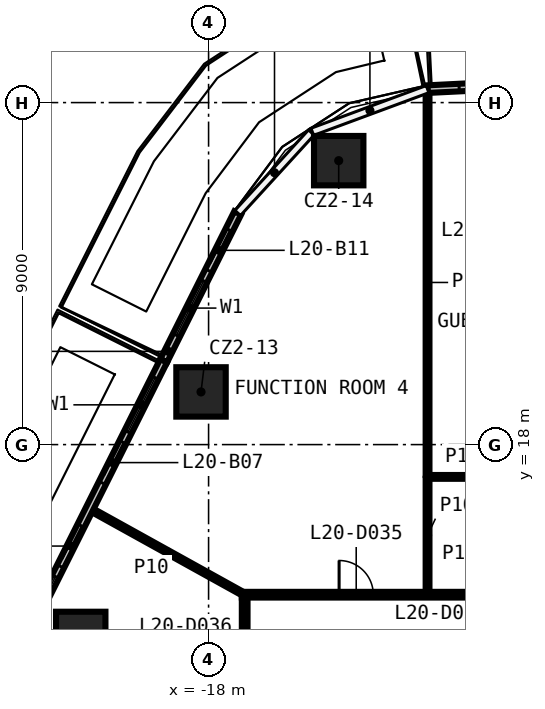
"""IFC4 building model, lengths in metres.
Left out: names, types, materials, properties, quantities, classifications, styles, units other than length and angle.
Written with IfcOpenShell. Run it as: python <this file> out.ifc"""

import sys

from ifc_helpers import new_model, si_unit, direction, frame, frame_2d, origin, origin_2d, place, context, subcontext, project, spatial, rectangle, extrude, element, fill, save


model = new_model("IFC4")
c1 = context("Model", 3, precision=1e-05, world=origin(), true_north=direction((0.0, 1.0)))
c2 = subcontext(c1, "Body", "Model", "MODEL_VIEW")
j1 = project(units=[si_unit("LENGTHUNIT", "METRE"), si_unit("PLANEANGLEUNIT", "RADIAN")], contexts=[c1])
p1 = place(None, origin())
s1 = spatial("IfcSite", under=j1, at=p1, CompositionType="ELEMENT")
p2 = place(p1, origin())
s2 = spatial("IfcBuilding", under=s1, at=p2, CompositionType="ELEMENT")
p3 = place(p2, frame((0.0, 0.0, 98.9)))
s3 = spatial("IfcBuildingStorey", under=s2, at=p3, CompositionType="ELEMENT", Elevation=98.9)
for number, where, z_axis, x_axis in (
    (1, (-21.364, 12.952, 0.0), (0.0, 0.0, 1.0), (1.0, 0.0, 0.0)),
    (2, (-18.199, 19.386, 0.0), (0.0, 0.0, 1.0), (1.0, 0.0, 0.0)),
    (3, (-14.576, 25.472, 0.0), (0.0, 0.0, 1.0), (1.0, 0.0, 0.0)),
):
    element("IfcColumn", number, at=place(p3, frame(where, z_axis=z_axis, x_axis=x_axis)), inside=s3, PredefinedType="COLUMN", context=c2, shape_type="SweptSolid", body=[
        extrude(rectangle(XDim=1.3, YDim=1.3, at=origin_2d()), origin(), (0.0, 0.0, 1.0), 3.25),
    ])
p4 = place(p3, frame((-17.125, 14.05, 0.0), z_axis=(0.0, 0.0, 1.0), x_axis=(1.0, 0.0, 0.0)))
e4 = element("IfcWall", 4, at=p4, inside=s3, PredefinedType="PARTITIONING", context=c2, shape_type="SweptSolid", body=[
    extrude(rectangle(XDim=34.25, YDim=0.15, at=frame_2d((17.125, 0.0))), origin(), (0.0, 0.0, 1.0), 3.25),
])
p5 = place(p4, frame((29.757, 0.0, 0.0)))
e5 = element("IfcOpeningElement", 5, at=p5, cuts=e4, PredefinedType="OPENING", context=c2, shape_type="SweptSolid", body=[
    extrude(rectangle(XDim=1.0, YDim=2.1, at=frame_2d((0.5, 1.05))), frame((0.0, 0.085, 0.0), z_axis=(0.0, -1.0, 0.0), x_axis=(1.0, 0.0, 0.0)), (0.0, 0.0, 1.0), 0.17),
])
p6 = place(p4, frame((18.682, 0.0, 0.0)))
e6 = element("IfcOpeningElement", 6, at=p6, cuts=e4, PredefinedType="OPENING", context=c2, shape_type="SweptSolid", body=[
    extrude(rectangle(XDim=1.0, YDim=2.1, at=frame_2d((0.5, 1.05))), frame((0.0, 0.085, 0.0), z_axis=(0.0, -1.0, 0.0), x_axis=(1.0, 0.0, 0.0)), (0.0, 0.0, 1.0), 0.17),
])
p7 = place(p4, frame((16.654, 0.0, 0.0)))
e7 = element("IfcOpeningElement", 7, at=p7, cuts=e4, PredefinedType="OPENING", context=c2, shape_type="SweptSolid", body=[
    extrude(rectangle(XDim=1.0, YDim=2.1, at=frame_2d((0.5, 1.05))), frame((0.0, 0.085, 0.0), z_axis=(0.0, -1.0, 0.0), x_axis=(1.0, 0.0, 0.0)), (0.0, 0.0, 1.0), 0.17),
])
p8 = place(p4, frame((9.827, 0.0, 0.0)))
e8 = element("IfcOpeningElement", 8, at=p8, cuts=e4, PredefinedType="OPENING", context=c2, shape_type="SweptSolid", body=[
    extrude(rectangle(XDim=1.0, YDim=2.1, at=frame_2d((0.5, 1.05))), frame((0.0, 0.085, 0.0), z_axis=(0.0, -1.0, 0.0), x_axis=(1.0, 0.0, 0.0)), (0.0, 0.0, 1.0), 0.17),
])
p9 = place(p4, frame((7.8, 0.0, 0.0)))
e9 = element("IfcOpeningElement", 9, at=p9, cuts=e4, PredefinedType="OPENING", context=c2, shape_type="SweptSolid", body=[
    extrude(rectangle(XDim=1.0, YDim=2.1, at=frame_2d((0.5, 1.05))), frame((0.0, 0.085, 0.0), z_axis=(0.0, -1.0, 0.0), x_axis=(1.0, 0.0, 0.0)), (0.0, 0.0, 1.0), 0.17),
])
p10 = place(p4, frame((2.56, 0.0, 0.0)))
e10 = element("IfcOpeningElement", 10, at=p10, cuts=e4, PredefinedType="OPENING", context=c2, shape_type="SweptSolid", body=[
    extrude(rectangle(XDim=0.9, YDim=2.1, at=frame_2d((0.45, 1.05))), frame((0.0, 0.085, 0.0), z_axis=(0.0, -1.0, 0.0), x_axis=(1.0, 0.0, 0.0)), (0.0, 0.0, 1.0), 0.17),
])
p11 = place(p3, frame((-12.238, 17.15, 0.0), z_axis=(0.0, 0.0, 1.0), x_axis=(1.0, 0.0, 0.0)))
e11 = element("IfcWall", 11, at=p11, inside=s3, PredefinedType="PARTITIONING", context=c2, shape_type="SweptSolid", body=[
    extrude(rectangle(XDim=2.45, YDim=0.1, at=frame_2d((1.225, 0.0))), origin(), (0.0, 0.0, 1.0), 3.25),
])
p12 = place(p3, frame((-12.238, 14.125, 0.0), z_axis=(0.0, 0.0, 1.0), x_axis=(0.0, 1.0, 0.0)))
e12 = element("IfcWall", 12, at=p12, inside=s3, PredefinedType="PARTITIONING", context=c2, shape_type="SweptSolid", body=[
    extrude(rectangle(XDim=2.975, YDim=0.1, at=frame_2d((1.488, 0.0))), origin(), (0.0, 0.0, 1.0), 3.25),
])
p13 = place(p3, frame((-12.238, 17.2, 0.0), z_axis=(0.0, 0.0, 1.0), x_axis=(0.0, 1.0, 0.0)))
e13 = element("IfcWall", 13, at=p13, inside=s3, PredefinedType="PARTITIONING", context=c2, shape_type="SweptSolid", body=[
    extrude(rectangle(XDim=10.133, YDim=0.1, at=frame_2d((5.067, 0.0))), origin(), (0.0, 0.0, 1.0), 3.25),
])
p14 = place(p3, frame((-17.05, -13.975, 0.0), z_axis=(0.0, 0.0, 1.0), x_axis=(0.0, 1.0, 0.0)))
e14 = element("IfcWall", 14, at=p14, inside=s3, PredefinedType="PARTITIONING", context=c2, shape_type="SweptSolid", body=[
    extrude(rectangle(XDim=27.95, YDim=0.15, at=frame_2d((13.975, 0.0))), origin(), (0.0, 0.0, 1.0), 3.25),
])
p15 = place(p14, frame((11.195, 0.0, 0.0)))
e15 = element("IfcOpeningElement", 15, at=p15, cuts=e14, PredefinedType="OPENING", context=c2, shape_type="SweptSolid", body=[
    extrude(rectangle(XDim=0.9, YDim=2.1, at=frame_2d((0.45, 1.05))), frame((0.0, 0.085, 0.0), z_axis=(0.0, -1.0, 0.0), x_axis=(1.0, 0.0, 0.0)), (0.0, 0.0, 1.0), 0.17),
])
p16 = place(p14, frame((8.57, 0.0, 0.0)))
e16 = element("IfcOpeningElement", 16, at=p16, cuts=e14, PredefinedType="OPENING", context=c2, shape_type="SweptSolid", body=[
    extrude(rectangle(XDim=0.9, YDim=2.1, at=frame_2d((0.45, 1.05))), frame((0.0, 0.085, 0.0), z_axis=(0.0, -1.0, 0.0), x_axis=(1.0, 0.0, 0.0)), (0.0, 0.0, 1.0), 0.17),
])
p17 = place(p14, frame((1.956, 0.0, 0.0)))
e17 = element("IfcOpeningElement", 17, at=p17, cuts=e14, PredefinedType="OPENING", context=c2, shape_type="SweptSolid", body=[
    extrude(rectangle(XDim=0.9, YDim=2.1, at=frame_2d((0.45, 1.05))), frame((0.0, 0.085, 0.0), z_axis=(0.0, -1.0, 0.0), x_axis=(1.0, 0.0, 0.0)), (0.0, 0.0, 1.0), 0.17),
])
p18 = place(p14, frame((25.181, 0.0, 0.0)))
e18 = element("IfcOpeningElement", 18, at=p18, cuts=e14, PredefinedType="OPENING", context=c2, shape_type="SweptSolid", body=[
    extrude(rectangle(XDim=0.9, YDim=2.1, at=frame_2d((0.45, 1.05))), frame((0.0, 0.085, 0.0), z_axis=(0.0, -1.0, 0.0), x_axis=(1.0, 0.0, 0.0)), (0.0, 0.0, 1.0), 0.17),
])
p19 = place(p14, frame((20.101, 0.0, 0.0)))
e19 = element("IfcOpeningElement", 19, at=p19, cuts=e14, PredefinedType="OPENING", context=c2, shape_type="SweptSolid", body=[
    extrude(rectangle(XDim=0.9, YDim=2.1, at=frame_2d((0.45, 1.05))), frame((0.0, 0.085, 0.0), z_axis=(0.0, -1.0, 0.0), x_axis=(1.0, 0.0, 0.0)), (0.0, 0.0, 1.0), 0.17),
])
p20 = place(p14, frame((16.206, 0.0, 0.0)))
e20 = element("IfcOpeningElement", 20, at=p20, cuts=e14, PredefinedType="OPENING", context=c2, shape_type="SweptSolid", body=[
    extrude(rectangle(XDim=0.9, YDim=2.1, at=frame_2d((0.45, 1.05))), frame((0.0, 0.085, 0.0), z_axis=(0.0, -1.0, 0.0), x_axis=(1.0, 0.0, 0.0)), (0.0, 0.0, 1.0), 0.17),
])
p21 = place(p3, frame((-21.115, 16.303, 0.0), z_axis=(0.0, 0.0, 1.0), x_axis=(0.874615252971, -0.484817655692, 0.0)))
e21 = element("IfcWall", 21, at=p21, inside=s3, PredefinedType="PARTITIONING", context=c2, shape_type="SweptSolid", body=[
    extrude(rectangle(XDim=4.648, YDim=0.1, at=frame_2d((2.324, 0.0))), origin(), (0.0, 0.0, 1.0), 3.25),
])
p22 = place(p3, frame((1.042, 28.012, 0.0), z_axis=(0.0, 0.0, 1.0), x_axis=(-0.998772222794, -0.049538338427, 0.0)))
e22 = element("IfcWall", 22, at=p22, inside=s3, PredefinedType="SOLIDWALL", context=c2, shape_type="SweptSolid", body=[
    extrude(rectangle(XDim=13.297, YDim=0.2, at=frame_2d((6.648, 0.0))), origin(), (0.0, 0.0, 1.0), 3.25),
])
p23 = place(p22, frame((2.0, 0.0, 0.6)))
e23 = element("IfcOpeningElement", 23, at=p23, cuts=e22, PredefinedType="OPENING", context=c2, shape_type="SweptSolid", body=[
    extrude(rectangle(XDim=1.6, YDim=2.4, at=frame_2d((0.8, 1.2))), frame((0.0, 0.11, 0.0), z_axis=(0.0, -1.0, 0.0), x_axis=(1.0, 0.0, 0.0)), (0.0, 0.0, 1.0), 0.22),
])
p24 = place(p22, frame((0.5, 0.0, 0.0)))
e24 = element("IfcOpeningElement", 24, at=p24, cuts=e22, PredefinedType="OPENING", context=c2, shape_type="SweptSolid", body=[
    extrude(rectangle(XDim=1.2, YDim=2.4, at=frame_2d((0.6, 1.2))), frame((0.0, 0.11, 0.0), z_axis=(0.0, -1.0, 0.0), x_axis=(1.0, 0.0, 0.0)), (0.0, 0.0, 1.0), 0.22),
])
p25 = place(p22, frame((6.432, 0.0, 0.6)))
e25 = element("IfcOpeningElement", 25, at=p25, cuts=e22, PredefinedType="OPENING", context=c2, shape_type="SweptSolid", body=[
    extrude(rectangle(XDim=1.6, YDim=2.4, at=frame_2d((0.8, 1.2))), frame((0.0, 0.11, 0.0), z_axis=(0.0, -1.0, 0.0), x_axis=(1.0, 0.0, 0.0)), (0.0, 0.0, 1.0), 0.22),
])
p26 = place(p22, frame((4.932, 0.0, 0.0)))
e26 = element("IfcOpeningElement", 26, at=p26, cuts=e22, PredefinedType="OPENING", context=c2, shape_type="SweptSolid", body=[
    extrude(rectangle(XDim=1.2, YDim=2.4, at=frame_2d((0.6, 1.2))), frame((0.0, 0.11, 0.0), z_axis=(0.0, -1.0, 0.0), x_axis=(1.0, 0.0, 0.0)), (0.0, 0.0, 1.0), 0.22),
])
p27 = place(p22, frame((9.365, 0.0, 0.6)))
e27 = element("IfcOpeningElement", 27, at=p27, cuts=e22, PredefinedType="OPENING", context=c2, shape_type="SweptSolid", body=[
    extrude(rectangle(XDim=1.6, YDim=2.4, at=frame_2d((0.8, 1.2))), frame((0.0, 0.11, 0.0), z_axis=(0.0, -1.0, 0.0), x_axis=(1.0, 0.0, 0.0)), (0.0, 0.0, 1.0), 0.22),
])
p28 = place(p22, frame((11.264, 0.0, 0.0)))
e28 = element("IfcOpeningElement", 28, at=p28, cuts=e22, PredefinedType="OPENING", context=c2, shape_type="SweptSolid", body=[
    extrude(rectangle(XDim=1.2, YDim=2.4, at=frame_2d((0.6, 1.2))), frame((0.0, 0.11, 0.0), z_axis=(0.0, -1.0, 0.0), x_axis=(1.0, 0.0, 0.0)), (0.0, 0.0, 1.0), 0.22),
])
p29 = place(p3, frame((-19.181, 20.208, 0.0), z_axis=(0.0, 0.0, 1.0), x_axis=(-0.447953166305, -0.894057023236, 0.0)))
e29 = element("IfcWall", 29, at=p29, inside=s3, PredefinedType="SOLIDWALL", context=c2, shape_type="SweptSolid", body=[
    extrude(rectangle(XDim=17.426, YDim=0.2, at=frame_2d((8.713, 0.0))), origin(), (0.0, 0.0, 1.0), 3.25),
])
p30 = place(p29, frame((0.5, 0.0, 0.6)))
e30 = element("IfcOpeningElement", 30, at=p30, cuts=e29, PredefinedType="OPENING", context=c2, shape_type="SweptSolid", body=[
    extrude(rectangle(XDim=1.6, YDim=2.4, at=frame_2d((0.8, 1.2))), frame((0.0, 0.11, 0.0), z_axis=(0.0, -1.0, 0.0), x_axis=(1.0, 0.0, 0.0)), (0.0, 0.0, 1.0), 0.22),
])
p31 = place(p29, frame((2.4, 0.0, 0.0)))
e31 = element("IfcOpeningElement", 31, at=p31, cuts=e29, PredefinedType="OPENING", context=c2, shape_type="SweptSolid", body=[
    extrude(rectangle(XDim=1.2, YDim=2.4, at=frame_2d((0.6, 1.2))), frame((0.0, 0.11, 0.0), z_axis=(0.0, -1.0, 0.0), x_axis=(1.0, 0.0, 0.0)), (0.0, 0.0, 1.0), 0.22),
])
p32 = place(p29, frame((6.357, 0.0, 0.6)))
e32 = element("IfcOpeningElement", 32, at=p32, cuts=e29, PredefinedType="OPENING", context=c2, shape_type="SweptSolid", body=[
    extrude(rectangle(XDim=1.6, YDim=2.4, at=frame_2d((0.8, 1.2))), frame((0.0, 0.11, 0.0), z_axis=(0.0, -1.0, 0.0), x_axis=(1.0, 0.0, 0.0)), (0.0, 0.0, 1.0), 0.22),
])
p33 = place(p29, frame((4.857, 0.0, 0.0)))
e33 = element("IfcOpeningElement", 33, at=p33, cuts=e29, PredefinedType="OPENING", context=c2, shape_type="SweptSolid", body=[
    extrude(rectangle(XDim=1.2, YDim=2.4, at=frame_2d((0.6, 1.2))), frame((0.0, 0.11, 0.0), z_axis=(0.0, -1.0, 0.0), x_axis=(1.0, 0.0, 0.0)), (0.0, 0.0, 1.0), 0.22),
])
p34 = place(p29, frame((10.713, 0.0, 0.6)))
e34 = element("IfcOpeningElement", 34, at=p34, cuts=e29, PredefinedType="OPENING", context=c2, shape_type="SweptSolid", body=[
    extrude(rectangle(XDim=1.6, YDim=2.4, at=frame_2d((0.8, 1.2))), frame((0.0, 0.11, 0.0), z_axis=(0.0, -1.0, 0.0), x_axis=(1.0, 0.0, 0.0)), (0.0, 0.0, 1.0), 0.22),
])
p35 = place(p29, frame((9.213, 0.0, 0.0)))
e35 = element("IfcOpeningElement", 35, at=p35, cuts=e29, PredefinedType="OPENING", context=c2, shape_type="SweptSolid", body=[
    extrude(rectangle(XDim=1.2, YDim=2.4, at=frame_2d((0.6, 1.2))), frame((0.0, 0.11, 0.0), z_axis=(0.0, -1.0, 0.0), x_axis=(1.0, 0.0, 0.0)), (0.0, 0.0, 1.0), 0.22),
])
p36 = place(p29, frame((13.57, 0.0, 0.6)))
e36 = element("IfcOpeningElement", 36, at=p36, cuts=e29, PredefinedType="OPENING", context=c2, shape_type="SweptSolid", body=[
    extrude(rectangle(XDim=1.6, YDim=2.4, at=frame_2d((0.8, 1.2))), frame((0.0, 0.11, 0.0), z_axis=(0.0, -1.0, 0.0), x_axis=(1.0, 0.0, 0.0)), (0.0, 0.0, 1.0), 0.22),
])
p37 = place(p29, frame((15.67, 0.0, 0.0)))
e37 = element("IfcOpeningElement", 37, at=p37, cuts=e29, PredefinedType="OPENING", context=c2, shape_type="SweptSolid", body=[
    extrude(rectangle(XDim=1.2, YDim=2.4, at=frame_2d((0.6, 1.2))), frame((0.0, 0.11, 0.0), z_axis=(0.0, -1.0, 0.0), x_axis=(1.0, 0.0, 0.0)), (0.0, 0.0, 1.0), 0.22),
])
p38 = place(p3, frame((-17.233, 24.096, 0.0), z_axis=(0.0, 0.0, 1.0), x_axis=(-0.447977093624, -0.89404503443, 0.0)))
e38 = element("IfcWall", 38, at=p38, inside=s3, PredefinedType="SOLIDWALL", context=c2, shape_type="SweptSolid", body=[
    extrude(rectangle(XDim=4.348, YDim=0.2, at=frame_2d((2.174, 0.0))), origin(), (0.0, 0.0, 1.0), 3.25),
])
p39 = place(p38, frame((2.0, 0.0, 0.6)))
e39 = element("IfcOpeningElement", 39, at=p39, cuts=e38, PredefinedType="OPENING", context=c2, shape_type="SweptSolid", body=[
    extrude(rectangle(XDim=1.6, YDim=2.4, at=frame_2d((0.8, 1.2))), frame((0.0, 0.11, 0.0), z_axis=(0.0, -1.0, 0.0), x_axis=(1.0, 0.0, 0.0)), (0.0, 0.0, 1.0), 0.22),
])
p40 = place(p38, frame((0.5, 0.0, 0.0)))
e40 = element("IfcOpeningElement", 40, at=p40, cuts=e38, PredefinedType="OPENING", context=c2, shape_type="SweptSolid", body=[
    extrude(rectangle(XDim=1.2, YDim=2.4, at=frame_2d((0.6, 1.2))), frame((0.0, 0.11, 0.0), z_axis=(0.0, -1.0, 0.0), x_axis=(1.0, 0.0, 0.0)), (0.0, 0.0, 1.0), 0.22),
])
p41 = place(p10, origin())
e41 = element("IfcDoor", 41, at=p41, inside=s3, OperationType="SINGLE_SWING_RIGHT", PredefinedType="DOOR", context=c2, shape_type="SweptSolid", body=[
    extrude(rectangle(XDim=0.9, YDim=2.1, at=frame_2d((0.45, 1.05))), frame((0.0, 0.025, 0.0), z_axis=(0.0, -1.0, 0.0), x_axis=(1.0, 0.0, 0.0)), (0.0, 0.0, 1.0), 0.05),
])
fill(e10, e41)
p42 = place(p28, origin())
e42 = element("IfcDoor", 42, at=p42, inside=s3, OperationType="SLIDING_TO_LEFT", PredefinedType="DOOR", context=c2, shape_type="SweptSolid", body=[
    extrude(rectangle(XDim=1.2, YDim=2.4, at=frame_2d((0.6, 1.2))), frame((0.0, 0.025, 0.0), z_axis=(0.0, -1.0, 0.0), x_axis=(1.0, 0.0, 0.0)), (0.0, 0.0, 1.0), 0.05),
])
fill(e28, e42)
p43 = place(p30, origin())
e43 = element("IfcWindow", 43, at=p43, inside=s3, PartitioningType="SINGLE_PANEL", PredefinedType="WINDOW", context=c2, shape_type="SweptSolid", body=[
    extrude(rectangle(XDim=1.6, YDim=2.4, at=frame_2d((0.8, 1.2))), frame((0.0, 0.03, 0.0), z_axis=(0.0, -1.0, 0.0), x_axis=(1.0, 0.0, 0.0)), (0.0, 0.0, 1.0), 0.06),
])
fill(e30, e43)
p44 = place(p31, origin())
e44 = element("IfcDoor", 44, at=p44, inside=s3, OperationType="SLIDING_TO_LEFT", PredefinedType="DOOR", context=c2, shape_type="SweptSolid", body=[
    extrude(rectangle(XDim=1.2, YDim=2.4, at=frame_2d((0.6, 1.2))), frame((0.0, 0.025, 0.0), z_axis=(0.0, -1.0, 0.0), x_axis=(1.0, 0.0, 0.0)), (0.0, 0.0, 1.0), 0.05),
])
fill(e31, e44)
p45 = place(p32, origin())
e45 = element("IfcWindow", 45, at=p45, inside=s3, PartitioningType="SINGLE_PANEL", PredefinedType="WINDOW", context=c2, shape_type="SweptSolid", body=[
    extrude(rectangle(XDim=1.6, YDim=2.4, at=frame_2d((0.8, 1.2))), frame((0.0, 0.03, 0.0), z_axis=(0.0, -1.0, 0.0), x_axis=(1.0, 0.0, 0.0)), (0.0, 0.0, 1.0), 0.06),
])
fill(e32, e45)
p46 = place(p33, origin())
e46 = element("IfcDoor", 46, at=p46, inside=s3, OperationType="SLIDING_TO_LEFT", PredefinedType="DOOR", context=c2, shape_type="SweptSolid", body=[
    extrude(rectangle(XDim=1.2, YDim=2.4, at=frame_2d((0.6, 1.2))), frame((0.0, 0.025, 0.0), z_axis=(0.0, -1.0, 0.0), x_axis=(1.0, 0.0, 0.0)), (0.0, 0.0, 1.0), 0.05),
])
fill(e33, e46)
p47 = place(p39, origin())
e47 = element("IfcWindow", 47, at=p47, inside=s3, PartitioningType="SINGLE_PANEL", PredefinedType="WINDOW", context=c2, shape_type="SweptSolid", body=[
    extrude(rectangle(XDim=1.6, YDim=2.4, at=frame_2d((0.8, 1.2))), frame((0.0, 0.03, 0.0), z_axis=(0.0, -1.0, 0.0), x_axis=(1.0, 0.0, 0.0)), (0.0, 0.0, 1.0), 0.06),
])
fill(e39, e47)
p48 = place(p40, origin())
e48 = element("IfcDoor", 48, at=p48, inside=s3, OperationType="SLIDING_TO_LEFT", PredefinedType="DOOR", context=c2, shape_type="SweptSolid", body=[
    extrude(rectangle(XDim=1.2, YDim=2.4, at=frame_2d((0.6, 1.2))), frame((0.0, 0.025, 0.0), z_axis=(0.0, -1.0, 0.0), x_axis=(1.0, 0.0, 0.0)), (0.0, 0.0, 1.0), 0.05),
])
fill(e40, e48)
save(model, sys.argv[1])
